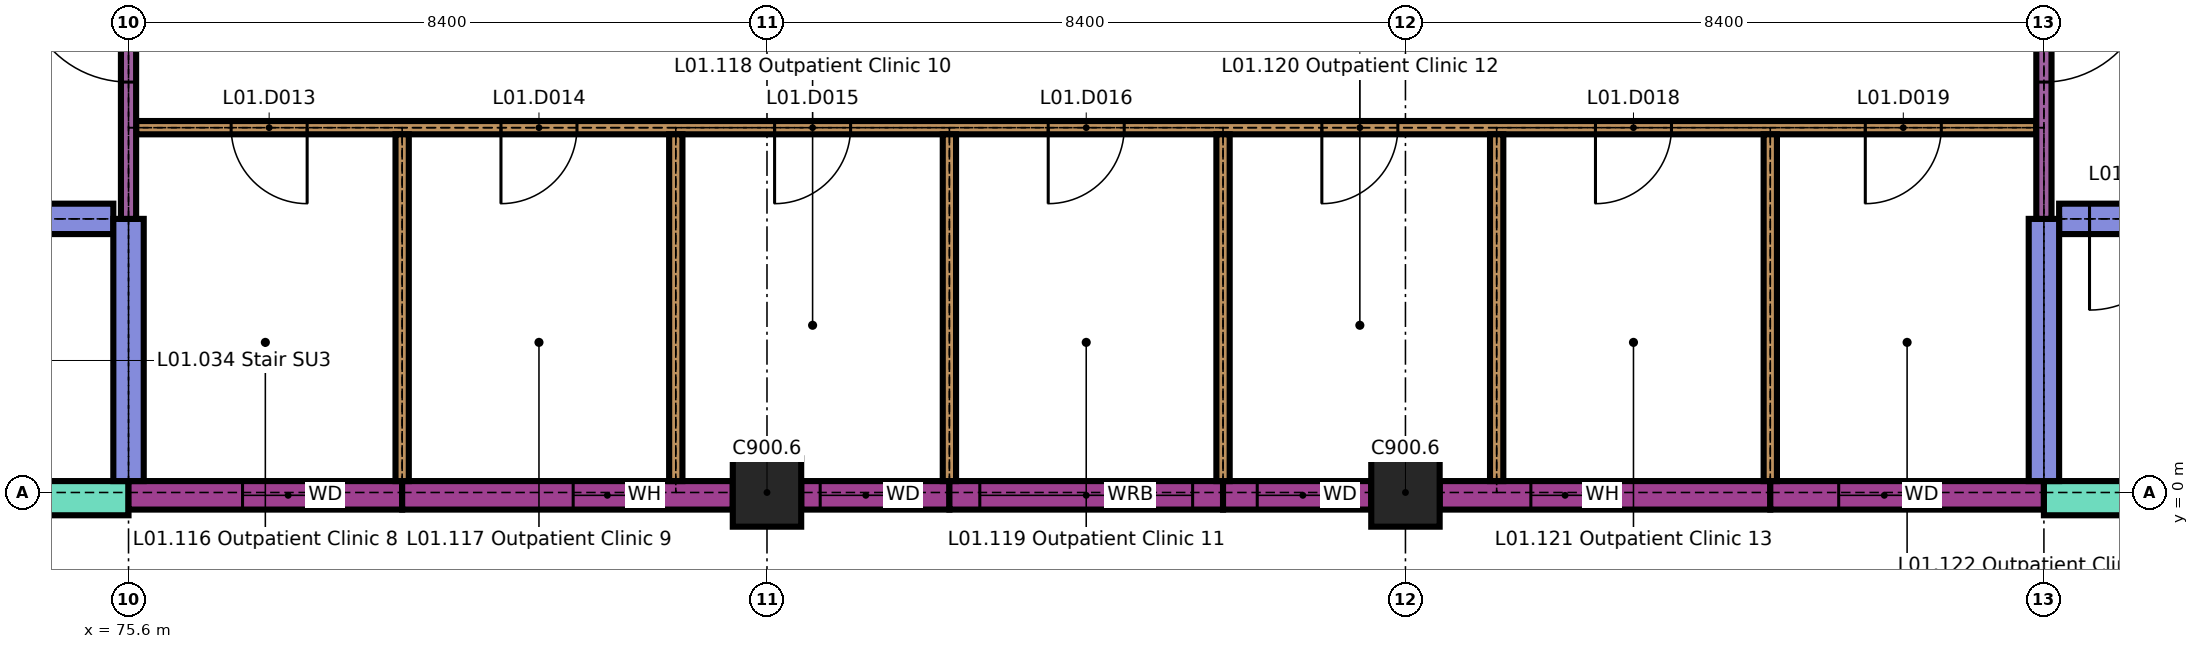
"""IFC4 building model, lengths in metres.
Left out: names, types, materials, properties, quantities, classifications, styles, units other than length and angle.
Written with IfcOpenShell. Run it as: python <this file> out.ifc"""

import sys

from ifc_helpers import new_model, si_unit, direction, frame, frame_2d, origin, origin_2d, place, context, subcontext, project, spatial, rectangle, extrude, element, fill, save


model = new_model("IFC4")
c1 = context("Model", 3, precision=1e-05, world=origin(), true_north=direction((0.0, 1.0)))
c2 = subcontext(c1, "Body", "Model", "MODEL_VIEW")
j1 = project(units=[si_unit("LENGTHUNIT", "METRE"), si_unit("PLANEANGLEUNIT", "RADIAN")], contexts=[c1])
p1 = place(None, origin())
s1 = spatial("IfcSite", under=j1, at=p1, CompositionType="ELEMENT")
p2 = place(p1, origin())
s2 = spatial("IfcBuilding", under=s1, at=p2, CompositionType="ELEMENT")
p3 = place(p2, frame((0.0, 0.0, 4.5)))
s3 = spatial("IfcBuildingStorey", under=s2, at=p3, CompositionType="ELEMENT", Elevation=4.5)
for number, where, z_axis, x_axis in (
    (1, (84.0, 0.0, 0.0), (0.0, 0.0, 1.0), (1.0, 0.0, 0.0)),
    (2, (92.4, 0.0, 0.0), (0.0, 0.0, 1.0), (1.0, 0.0, 0.0)),
):
    element("IfcColumn", number, at=place(p3, frame(where, z_axis=z_axis, x_axis=x_axis)), inside=s3, PredefinedType="COLUMN", context=c2, shape_type="SweptSolid", body=[
        extrude(rectangle(XDim=0.9, YDim=0.9, at=origin_2d()), origin(), (0.0, 0.0, 1.0), 3.45),
    ])
p4 = place(p3, frame((71.75, -0.075, 0.0), z_axis=(0.0, 0.0, 1.0), x_axis=(1.0, 0.0, 0.0)))
e3 = element("IfcWall", 3, at=p4, inside=s3, PredefinedType="SOLIDWALL", context=c2, shape_type="SweptSolid", body=[
    extrude(rectangle(XDim=3.85, YDim=0.45, at=frame_2d((1.925, 0.0))), origin(), (0.0, 0.0, 1.0), 3.45),
])
p5 = place(p3, frame((75.6, -0.038, 0.0), z_axis=(0.0, 0.0, 1.0), x_axis=(1.0, 0.0, 0.0)))
e4 = element("IfcWall", 4, at=p5, inside=s3, PredefinedType="SOLIDWALL", context=c2, shape_type="SweptSolid", body=[
    extrude(rectangle(XDim=3.6, YDim=0.375, at=frame_2d((1.8, 0.0))), origin(), (0.0, 0.0, 1.0), 3.15),
])
p6 = place(p5, frame((1.5, 0.0, 0.9)))
e5 = element("IfcOpeningElement", 5, at=p6, cuts=e4, PredefinedType="OPENING", context=c2, shape_type="SweptSolid", body=[
    extrude(rectangle(XDim=1.2, YDim=1.5, at=frame_2d((0.6, 0.75))), frame((0.0, 0.198, 0.0), z_axis=(0.0, -1.0, 0.0), x_axis=(1.0, 0.0, 0.0)), (0.0, 0.0, 1.0), 0.395),
])
p7 = place(p3, frame((79.2, -0.038, 0.0), z_axis=(0.0, 0.0, 1.0), x_axis=(1.0, 0.0, 0.0)))
e6 = element("IfcWall", 6, at=p7, inside=s3, PredefinedType="SOLIDWALL", context=c2, shape_type="SweptSolid", body=[
    extrude(rectangle(XDim=4.35, YDim=0.375, at=frame_2d((2.175, 0.0))), origin(), (0.0, 0.0, 1.0), 3.15),
])
p8 = place(p7, frame((2.25, 0.0, 0.9)))
e7 = element("IfcOpeningElement", 7, at=p8, cuts=e6, PredefinedType="OPENING", context=c2, shape_type="SweptSolid", body=[
    extrude(rectangle(XDim=0.9, YDim=1.5, at=frame_2d((0.45, 0.75))), frame((0.0, 0.198, 0.0), z_axis=(0.0, -1.0, 0.0), x_axis=(1.0, 0.0, 0.0)), (0.0, 0.0, 1.0), 0.395),
])
p9 = place(p3, frame((84.45, -0.038, 0.0), z_axis=(0.0, 0.0, 1.0), x_axis=(1.0, 0.0, 0.0)))
e8 = element("IfcWall", 8, at=p9, inside=s3, PredefinedType="SOLIDWALL", context=c2, shape_type="SweptSolid", body=[
    extrude(rectangle(XDim=1.95, YDim=0.375, at=frame_2d((0.975, 0.0))), origin(), (0.0, 0.0, 1.0), 3.15),
])
p10 = place(p9, frame((0.25, 0.0, 0.9)))
e9 = element("IfcOpeningElement", 9, at=p10, cuts=e8, PredefinedType="OPENING", context=c2, shape_type="SweptSolid", body=[
    extrude(rectangle(XDim=1.2, YDim=1.5, at=frame_2d((0.6, 0.75))), frame((0.0, 0.198, 0.0), z_axis=(0.0, -1.0, 0.0), x_axis=(1.0, 0.0, 0.0)), (0.0, 0.0, 1.0), 0.395),
])
p11 = place(p3, frame((86.4, -0.038, 0.0), z_axis=(0.0, 0.0, 1.0), x_axis=(1.0, 0.0, 0.0)))
e10 = element("IfcWall", 10, at=p11, inside=s3, PredefinedType="SOLIDWALL", context=c2, shape_type="SweptSolid", body=[
    extrude(rectangle(XDim=3.6, YDim=0.375, at=frame_2d((1.8, 0.0))), origin(), (0.0, 0.0, 1.0), 3.15),
])
p12 = place(p11, frame((0.4, 0.0, 1.0)))
e11 = element("IfcOpeningElement", 11, at=p12, cuts=e10, PredefinedType="OPENING", context=c2, shape_type="SweptSolid", body=[
    extrude(rectangle(XDim=2.8, YDim=1.2, at=frame_2d((1.4, 0.6))), frame((0.0, 0.198, 0.0), z_axis=(0.0, -1.0, 0.0), x_axis=(1.0, 0.0, 0.0)), (0.0, 0.0, 1.0), 0.395),
])
p13 = place(p3, frame((90.0, -0.038, 0.0), z_axis=(0.0, 0.0, 1.0), x_axis=(1.0, 0.0, 0.0)))
e12 = element("IfcWall", 12, at=p13, inside=s3, PredefinedType="SOLIDWALL", context=c2, shape_type="SweptSolid", body=[
    extrude(rectangle(XDim=1.95, YDim=0.375, at=frame_2d((0.975, 0.0))), origin(), (0.0, 0.0, 1.0), 3.15),
])
p14 = place(p13, frame((0.45, 0.0, 0.9)))
e13 = element("IfcOpeningElement", 13, at=p14, cuts=e12, PredefinedType="OPENING", context=c2, shape_type="SweptSolid", body=[
    extrude(rectangle(XDim=1.2, YDim=1.5, at=frame_2d((0.6, 0.75))), frame((0.0, 0.198, 0.0), z_axis=(0.0, -1.0, 0.0), x_axis=(1.0, 0.0, 0.0)), (0.0, 0.0, 1.0), 0.395),
])
p15 = place(p3, frame((92.85, -0.038, 0.0), z_axis=(0.0, 0.0, 1.0), x_axis=(1.0, 0.0, 0.0)))
e14 = element("IfcWall", 14, at=p15, inside=s3, PredefinedType="SOLIDWALL", context=c2, shape_type="SweptSolid", body=[
    extrude(rectangle(XDim=4.35, YDim=0.375, at=frame_2d((2.175, 0.0))), origin(), (0.0, 0.0, 1.0), 3.15),
])
p16 = place(p15, frame((1.2, 0.0, 0.9)))
e15 = element("IfcOpeningElement", 15, at=p16, cuts=e14, PredefinedType="OPENING", context=c2, shape_type="SweptSolid", body=[
    extrude(rectangle(XDim=0.9, YDim=1.5, at=frame_2d((0.45, 0.75))), frame((0.0, 0.198, 0.0), z_axis=(0.0, -1.0, 0.0), x_axis=(1.0, 0.0, 0.0)), (0.0, 0.0, 1.0), 0.395),
])
p17 = place(p3, frame((97.2, -0.038, 0.0), z_axis=(0.0, 0.0, 1.0), x_axis=(1.0, 0.0, 0.0)))
e16 = element("IfcWall", 16, at=p17, inside=s3, PredefinedType="SOLIDWALL", context=c2, shape_type="SweptSolid", body=[
    extrude(rectangle(XDim=3.6, YDim=0.375, at=frame_2d((1.8, 0.0))), origin(), (0.0, 0.0, 1.0), 3.15),
])
p18 = place(p17, frame((0.9, 0.0, 0.9)))
e17 = element("IfcOpeningElement", 17, at=p18, cuts=e16, PredefinedType="OPENING", context=c2, shape_type="SweptSolid", body=[
    extrude(rectangle(XDim=1.2, YDim=1.5, at=frame_2d((0.6, 0.75))), frame((0.0, 0.198, 0.0), z_axis=(0.0, -1.0, 0.0), x_axis=(1.0, 0.0, 0.0)), (0.0, 0.0, 1.0), 0.395),
])
p19 = place(p3, frame((100.8, -0.075, 0.0), z_axis=(0.0, 0.0, 1.0), x_axis=(1.0, 0.0, 0.0)))
e18 = element("IfcWall", 18, at=p19, inside=s3, PredefinedType="SOLIDWALL", context=c2, shape_type="SweptSolid", body=[
    extrude(rectangle(XDim=3.15, YDim=0.45, at=frame_2d((1.575, 0.0))), origin(), (0.0, 0.0, 1.0), 3.45),
])
p20 = place(p3, frame((67.4, 3.6, 0.0), z_axis=(0.0, 0.0, 1.0), x_axis=(1.0, 0.0, 0.0)))
e19 = element("IfcWall", 19, at=p20, inside=s3, PredefinedType="SHEAR", context=c2, shape_type="SweptSolid", body=[
    extrude(rectangle(XDim=8.0, YDim=0.4, at=frame_2d((4.0, 0.0))), origin(), (0.0, 0.0, 1.0), 3.45),
])
p21 = place(p20, frame((0.4, 0.0, 0.0)))
e20 = element("IfcOpeningElement", 20, at=p21, cuts=e19, PredefinedType="OPENING", context=c2, shape_type="SweptSolid", body=[
    extrude(rectangle(XDim=1.2, YDim=2.1, at=frame_2d((0.6, 1.05))), frame((0.0, 0.21, 0.0), z_axis=(0.0, -1.0, 0.0), x_axis=(1.0, 0.0, 0.0)), (0.0, 0.0, 1.0), 0.42),
])
p22 = place(p3, frame((101.0, 3.6, 0.0), z_axis=(0.0, 0.0, 1.0), x_axis=(1.0, 0.0, 0.0)))
e21 = element("IfcWall", 21, at=p22, inside=s3, PredefinedType="SHEAR", context=c2, shape_type="SweptSolid", body=[
    extrude(rectangle(XDim=8.0, YDim=0.4, at=frame_2d((4.0, 0.0))), origin(), (0.0, 0.0, 1.0), 3.45),
])
p23 = place(p22, frame((0.4, 0.0, 0.0)))
e22 = element("IfcOpeningElement", 22, at=p23, cuts=e21, PredefinedType="OPENING", context=c2, shape_type="SweptSolid", body=[
    extrude(rectangle(XDim=1.2, YDim=2.1, at=frame_2d((0.6, 1.05))), frame((0.0, 0.21, 0.0), z_axis=(0.0, -1.0, 0.0), x_axis=(1.0, 0.0, 0.0)), (0.0, 0.0, 1.0), 0.42),
])
p24 = place(p3, frame((75.7, 4.8, 0.0), z_axis=(0.0, 0.0, 1.0), x_axis=(1.0, 0.0, 0.0)))
e23 = element("IfcWall", 23, at=p24, inside=s3, PredefinedType="PARTITIONING", context=c2, shape_type="SweptSolid", body=[
    extrude(rectangle(XDim=25.0, YDim=0.175, at=frame_2d((12.5, 0.0))), origin(), (0.0, 0.0, 1.0), 3.45),
])
p25 = place(p24, frame((1.25, 0.0, 0.0)))
e24 = element("IfcOpeningElement", 24, at=p25, cuts=e23, PredefinedType="OPENING", context=c2, shape_type="SweptSolid", body=[
    extrude(rectangle(XDim=1.0, YDim=2.1, at=frame_2d((0.5, 1.05))), frame((0.0, 0.097, 0.0), z_axis=(0.0, -1.0, 0.0), x_axis=(1.0, 0.0, 0.0)), (0.0, 0.0, 1.0), 0.195),
])
p26 = place(p24, frame((4.8, 0.0, 0.0)))
e25 = element("IfcOpeningElement", 25, at=p26, cuts=e23, PredefinedType="OPENING", context=c2, shape_type="SweptSolid", body=[
    extrude(rectangle(XDim=1.0, YDim=2.1, at=frame_2d((0.5, 1.05))), frame((0.0, 0.097, 0.0), z_axis=(0.0, -1.0, 0.0), x_axis=(1.0, 0.0, 0.0)), (0.0, 0.0, 1.0), 0.195),
])
p27 = place(p24, frame((8.4, 0.0, 0.0)))
e26 = element("IfcOpeningElement", 26, at=p27, cuts=e23, PredefinedType="OPENING", context=c2, shape_type="SweptSolid", body=[
    extrude(rectangle(XDim=1.0, YDim=2.1, at=frame_2d((0.5, 1.05))), frame((0.0, 0.097, 0.0), z_axis=(0.0, -1.0, 0.0), x_axis=(1.0, 0.0, 0.0)), (0.0, 0.0, 1.0), 0.195),
])
p28 = place(p24, frame((12.0, 0.0, 0.0)))
e27 = element("IfcOpeningElement", 27, at=p28, cuts=e23, PredefinedType="OPENING", context=c2, shape_type="SweptSolid", body=[
    extrude(rectangle(XDim=1.0, YDim=2.1, at=frame_2d((0.5, 1.05))), frame((0.0, 0.097, 0.0), z_axis=(0.0, -1.0, 0.0), x_axis=(1.0, 0.0, 0.0)), (0.0, 0.0, 1.0), 0.195),
])
p29 = place(p24, frame((15.6, 0.0, 0.0)))
e28 = element("IfcOpeningElement", 28, at=p29, cuts=e23, PredefinedType="OPENING", context=c2, shape_type="SweptSolid", body=[
    extrude(rectangle(XDim=1.0, YDim=2.1, at=frame_2d((0.5, 1.05))), frame((0.0, 0.097, 0.0), z_axis=(0.0, -1.0, 0.0), x_axis=(1.0, 0.0, 0.0)), (0.0, 0.0, 1.0), 0.195),
])
p30 = place(p24, frame((19.2, 0.0, 0.0)))
e29 = element("IfcOpeningElement", 29, at=p30, cuts=e23, PredefinedType="OPENING", context=c2, shape_type="SweptSolid", body=[
    extrude(rectangle(XDim=1.0, YDim=2.1, at=frame_2d((0.5, 1.05))), frame((0.0, 0.097, 0.0), z_axis=(0.0, -1.0, 0.0), x_axis=(1.0, 0.0, 0.0)), (0.0, 0.0, 1.0), 0.195),
])
p31 = place(p24, frame((22.75, 0.0, 0.0)))
e30 = element("IfcOpeningElement", 30, at=p31, cuts=e23, PredefinedType="OPENING", context=c2, shape_type="SweptSolid", body=[
    extrude(rectangle(XDim=1.0, YDim=2.1, at=frame_2d((0.5, 1.05))), frame((0.0, 0.097, 0.0), z_axis=(0.0, -1.0, 0.0), x_axis=(1.0, 0.0, 0.0)), (0.0, 0.0, 1.0), 0.195),
])
p32 = place(p3, frame((75.6, 0.15, 0.0), z_axis=(0.0, 0.0, 1.0), x_axis=(0.0, 1.0, 0.0)))
e31 = element("IfcWall", 31, at=p32, inside=s3, PredefinedType="SHEAR", context=c2, shape_type="SweptSolid", body=[
    extrude(rectangle(XDim=3.45, YDim=0.4, at=frame_2d((1.725, 0.0))), origin(), (0.0, 0.0, 1.0), 3.45),
])
p33 = place(p3, frame((75.6, 3.6, 0.0), z_axis=(0.0, 0.0, 1.0), x_axis=(0.0, 1.0, 0.0)))
e32 = element("IfcWall", 32, at=p33, inside=s3, PredefinedType="PARTITIONING", context=c2, shape_type="SweptSolid", body=[
    extrude(rectangle(XDim=4.7, YDim=0.2, at=frame_2d((2.35, 0.0))), origin(), (0.0, 0.0, 1.0), 3.45),
])
p34 = place(p33, frame((1.8, 0.0, 0.0)))
e33 = element("IfcOpeningElement", 33, at=p34, cuts=e32, PredefinedType="OPENING", context=c2, shape_type="SweptSolid", body=[
    extrude(rectangle(XDim=1.4, YDim=2.1, at=frame_2d((0.7, 1.05))), frame((0.0, 0.11, 0.0), z_axis=(0.0, -1.0, 0.0), x_axis=(1.0, 0.0, 0.0)), (0.0, 0.0, 1.0), 0.22),
])
for number, where, z_axis, x_axis in (
    (34, (79.2, 0.15, 0.0), (0.0, 0.0, 1.0), (0.0, 1.0, 0.0)),
    (35, (82.8, 0.15, 0.0), (0.0, 0.0, 1.0), (0.0, 1.0, 0.0)),
    (36, (86.4, 0.15, 0.0), (0.0, 0.0, 1.0), (0.0, 1.0, 0.0)),
    (37, (90.0, 0.15, 0.0), (0.0, 0.0, 1.0), (0.0, 1.0, 0.0)),
    (38, (93.6, 0.15, 0.0), (0.0, 0.0, 1.0), (0.0, 1.0, 0.0)),
    (39, (97.2, 0.15, 0.0), (0.0, 0.0, 1.0), (0.0, 1.0, 0.0)),
):
    element("IfcWall", number, at=place(p3, frame(where, z_axis=z_axis, x_axis=x_axis)), inside=s3, PredefinedType="PARTITIONING", context=c2, shape_type="SweptSolid", body=[
        extrude(rectangle(XDim=4.562, YDim=0.175, at=frame_2d((2.281, 0.0))), origin(), (0.0, 0.0, 1.0), 3.45),
    ])
p35 = place(p3, frame((100.8, 0.15, 0.0), z_axis=(0.0, 0.0, 1.0), x_axis=(0.0, 1.0, 0.0)))
e40 = element("IfcWall", 40, at=p35, inside=s3, PredefinedType="SHEAR", context=c2, shape_type="SweptSolid", body=[
    extrude(rectangle(XDim=3.45, YDim=0.4, at=frame_2d((1.725, 0.0))), origin(), (0.0, 0.0, 1.0), 3.45),
])
p36 = place(p3, frame((100.8, 3.6, 0.0), z_axis=(0.0, 0.0, 1.0), x_axis=(0.0, 1.0, 0.0)))
e41 = element("IfcWall", 41, at=p36, inside=s3, PredefinedType="PARTITIONING", context=c2, shape_type="SweptSolid", body=[
    extrude(rectangle(XDim=4.8, YDim=0.2, at=frame_2d((2.4, 0.0))), origin(), (0.0, 0.0, 1.0), 3.45),
])
p37 = place(p36, frame((1.8, 0.0, 0.0)))
e42 = element("IfcOpeningElement", 42, at=p37, cuts=e41, PredefinedType="OPENING", context=c2, shape_type="SweptSolid", body=[
    extrude(rectangle(XDim=1.4, YDim=2.1, at=frame_2d((0.7, 1.05))), frame((0.0, 0.11, 0.0), z_axis=(0.0, -1.0, 0.0), x_axis=(1.0, 0.0, 0.0)), (0.0, 0.0, 1.0), 0.22),
])
p38 = place(p6, origin())
e43 = element("IfcWindow", 43, at=p38, inside=s3, PartitioningType="SINGLE_PANEL", PredefinedType="WINDOW", context=c2, shape_type="SweptSolid", body=[
    extrude(rectangle(XDim=1.2, YDim=1.5, at=frame_2d((0.6, 0.75))), frame((0.0, 0.03, 0.0), z_axis=(0.0, -1.0, 0.0), x_axis=(1.0, 0.0, 0.0)), (0.0, 0.0, 1.0), 0.06),
])
fill(e5, e43)
p39 = place(p8, origin())
e44 = element("IfcWindow", 44, at=p39, inside=s3, PartitioningType="SINGLE_PANEL", PredefinedType="WINDOW", context=c2, shape_type="SweptSolid", body=[
    extrude(rectangle(XDim=0.9, YDim=1.5, at=frame_2d((0.45, 0.75))), frame((0.0, 0.03, 0.0), z_axis=(0.0, -1.0, 0.0), x_axis=(1.0, 0.0, 0.0)), (0.0, 0.0, 1.0), 0.06),
])
fill(e7, e44)
p40 = place(p10, origin())
e45 = element("IfcWindow", 45, at=p40, inside=s3, PartitioningType="SINGLE_PANEL", PredefinedType="WINDOW", context=c2, shape_type="SweptSolid", body=[
    extrude(rectangle(XDim=1.2, YDim=1.5, at=frame_2d((0.6, 0.75))), frame((0.0, 0.03, 0.0), z_axis=(0.0, -1.0, 0.0), x_axis=(1.0, 0.0, 0.0)), (0.0, 0.0, 1.0), 0.06),
])
fill(e9, e45)
p41 = place(p12, origin())
e46 = element("IfcWindow", 46, at=p41, inside=s3, PartitioningType="DOUBLE_PANEL_VERTICAL", PredefinedType="WINDOW", context=c2, shape_type="SweptSolid", body=[
    extrude(rectangle(XDim=2.8, YDim=1.2, at=frame_2d((1.4, 0.6))), frame((0.0, 0.03, 0.0), z_axis=(0.0, -1.0, 0.0), x_axis=(1.0, 0.0, 0.0)), (0.0, 0.0, 1.0), 0.06),
])
fill(e11, e46)
p42 = place(p14, origin())
e47 = element("IfcWindow", 47, at=p42, inside=s3, PartitioningType="SINGLE_PANEL", PredefinedType="WINDOW", context=c2, shape_type="SweptSolid", body=[
    extrude(rectangle(XDim=1.2, YDim=1.5, at=frame_2d((0.6, 0.75))), frame((0.0, 0.03, 0.0), z_axis=(0.0, -1.0, 0.0), x_axis=(1.0, 0.0, 0.0)), (0.0, 0.0, 1.0), 0.06),
])
fill(e13, e47)
p43 = place(p16, origin())
e48 = element("IfcWindow", 48, at=p43, inside=s3, PartitioningType="SINGLE_PANEL", PredefinedType="WINDOW", context=c2, shape_type="SweptSolid", body=[
    extrude(rectangle(XDim=0.9, YDim=1.5, at=frame_2d((0.45, 0.75))), frame((0.0, 0.03, 0.0), z_axis=(0.0, -1.0, 0.0), x_axis=(1.0, 0.0, 0.0)), (0.0, 0.0, 1.0), 0.06),
])
fill(e15, e48)
p44 = place(p18, origin())
e49 = element("IfcWindow", 49, at=p44, inside=s3, PartitioningType="SINGLE_PANEL", PredefinedType="WINDOW", context=c2, shape_type="SweptSolid", body=[
    extrude(rectangle(XDim=1.2, YDim=1.5, at=frame_2d((0.6, 0.75))), frame((0.0, 0.03, 0.0), z_axis=(0.0, -1.0, 0.0), x_axis=(1.0, 0.0, 0.0)), (0.0, 0.0, 1.0), 0.06),
])
fill(e17, e49)
p45 = place(p23, origin())
e50 = element("IfcDoor", 50, at=p45, inside=s3, OperationType="SINGLE_SWING_LEFT", PredefinedType="DOOR", context=c2, shape_type="SweptSolid", body=[
    extrude(rectangle(XDim=1.2, YDim=2.1, at=frame_2d((0.6, 1.05))), frame((0.0, 0.025, 0.0), z_axis=(0.0, -1.0, 0.0), x_axis=(1.0, 0.0, 0.0)), (0.0, 0.0, 1.0), 0.05),
])
fill(e22, e50)
p46 = place(p25, origin())
e51 = element("IfcDoor", 51, at=p46, inside=s3, OperationType="SINGLE_SWING_RIGHT", PredefinedType="DOOR", context=c2, shape_type="SweptSolid", body=[
    extrude(rectangle(XDim=1.0, YDim=2.1, at=frame_2d((0.5, 1.05))), frame((0.0, 0.035, 0.0), z_axis=(0.0, -1.0, 0.0), x_axis=(1.0, 0.0, 0.0)), (0.0, 0.0, 1.0), 0.07),
])
fill(e24, e51)
p47 = place(p26, origin())
e52 = element("IfcDoor", 52, at=p47, inside=s3, OperationType="SINGLE_SWING_LEFT", PredefinedType="DOOR", context=c2, shape_type="SweptSolid", body=[
    extrude(rectangle(XDim=1.0, YDim=2.1, at=frame_2d((0.5, 1.05))), frame((0.0, 0.035, 0.0), z_axis=(0.0, -1.0, 0.0), x_axis=(1.0, 0.0, 0.0)), (0.0, 0.0, 1.0), 0.07),
])
fill(e25, e52)
p48 = place(p27, origin())
e53 = element("IfcDoor", 53, at=p48, inside=s3, OperationType="SINGLE_SWING_LEFT", PredefinedType="DOOR", context=c2, shape_type="SweptSolid", body=[
    extrude(rectangle(XDim=1.0, YDim=2.1, at=frame_2d((0.5, 1.05))), frame((0.0, 0.035, 0.0), z_axis=(0.0, -1.0, 0.0), x_axis=(1.0, 0.0, 0.0)), (0.0, 0.0, 1.0), 0.07),
])
fill(e26, e53)
p49 = place(p28, origin())
e54 = element("IfcDoor", 54, at=p49, inside=s3, OperationType="SINGLE_SWING_LEFT", PredefinedType="DOOR", context=c2, shape_type="SweptSolid", body=[
    extrude(rectangle(XDim=1.0, YDim=2.1, at=frame_2d((0.5, 1.05))), frame((0.0, 0.035, 0.0), z_axis=(0.0, -1.0, 0.0), x_axis=(1.0, 0.0, 0.0)), (0.0, 0.0, 1.0), 0.07),
])
fill(e27, e54)
p50 = place(p29, origin())
e55 = element("IfcDoor", 55, at=p50, inside=s3, OperationType="SINGLE_SWING_LEFT", PredefinedType="DOOR", context=c2, shape_type="SweptSolid", body=[
    extrude(rectangle(XDim=1.0, YDim=2.1, at=frame_2d((0.5, 1.05))), frame((0.0, 0.035, 0.0), z_axis=(0.0, -1.0, 0.0), x_axis=(1.0, 0.0, 0.0)), (0.0, 0.0, 1.0), 0.07),
])
fill(e28, e55)
p51 = place(p30, origin())
e56 = element("IfcDoor", 56, at=p51, inside=s3, OperationType="SINGLE_SWING_LEFT", PredefinedType="DOOR", context=c2, shape_type="SweptSolid", body=[
    extrude(rectangle(XDim=1.0, YDim=2.1, at=frame_2d((0.5, 1.05))), frame((0.0, 0.035, 0.0), z_axis=(0.0, -1.0, 0.0), x_axis=(1.0, 0.0, 0.0)), (0.0, 0.0, 1.0), 0.07),
])
fill(e29, e56)
p52 = place(p31, origin())
e57 = element("IfcDoor", 57, at=p52, inside=s3, OperationType="SINGLE_SWING_LEFT", PredefinedType="DOOR", context=c2, shape_type="SweptSolid", body=[
    extrude(rectangle(XDim=1.0, YDim=2.1, at=frame_2d((0.5, 1.05))), frame((0.0, 0.035, 0.0), z_axis=(0.0, -1.0, 0.0), x_axis=(1.0, 0.0, 0.0)), (0.0, 0.0, 1.0), 0.07),
])
fill(e30, e57)
p53 = place(p34, origin())
e58 = element("IfcDoor", 58, at=p53, inside=s3, OperationType="SINGLE_SWING_LEFT", PredefinedType="DOOR", context=c2, shape_type="SweptSolid", body=[
    extrude(rectangle(XDim=1.4, YDim=2.1, at=frame_2d((0.7, 1.05))), frame((0.0, 0.03, 0.0), z_axis=(0.0, -1.0, 0.0), x_axis=(1.0, 0.0, 0.0)), (0.0, 0.0, 1.0), 0.06),
])
fill(e33, e58)
p54 = place(p37, origin())
e59 = element("IfcDoor", 59, at=p54, inside=s3, OperationType="SINGLE_SWING_RIGHT", PredefinedType="DOOR", context=c2, shape_type="SweptSolid", body=[
    extrude(rectangle(XDim=1.4, YDim=2.1, at=frame_2d((0.7, 1.05))), frame((0.0, 0.03, 0.0), z_axis=(0.0, -1.0, 0.0), x_axis=(1.0, 0.0, 0.0)), (0.0, 0.0, 1.0), 0.06),
])
fill(e42, e59)
save(model, sys.argv[1])
